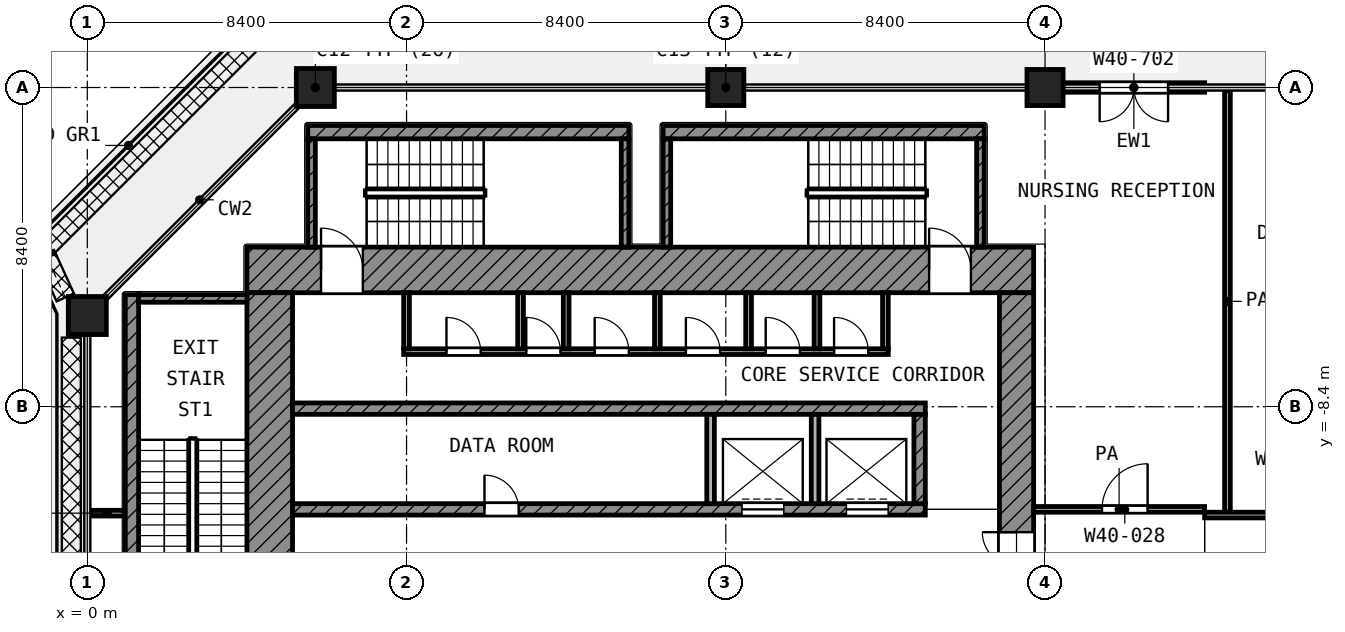
"""IFC4 building model, lengths in metres.
Left out: names, types, materials, properties, quantities, classifications, styles, units other than length and angle.
Written with IfcOpenShell. Run it as: python <this file> out.ifc"""

import sys

from ifc_helpers import new_model, si_unit, direction, frame, frame_2d, origin, origin_2d, place, context, subcontext, project, spatial, rectangle, extrude, element, fill, save


model = new_model("IFC4")
c1 = context("Model", 3, precision=1e-05, world=origin(), true_north=direction((0.0, 1.0)))
c2 = subcontext(c1, "Body", "Model", "MODEL_VIEW")
j1 = project(units=[si_unit("LENGTHUNIT", "METRE"), si_unit("PLANEANGLEUNIT", "RADIAN")], contexts=[c1])
p1 = place(None, origin())
s1 = spatial("IfcSite", under=j1, at=p1, CompositionType="ELEMENT")
p2 = place(p1, origin())
s2 = spatial("IfcBuilding", under=s1, at=p2, CompositionType="ELEMENT")
p3 = place(p2, frame((0.0, 0.0, 196.2)))
s3 = spatial("IfcBuildingStorey", under=s2, at=p3, CompositionType="ELEMENT", Elevation=196.2)
p4 = place(p3, frame((6.0, 0.0, 0.0), z_axis=(0.0, 0.0, 1.0), x_axis=(1.0, 0.0, 0.0)))
e1 = element("IfcColumn", 1, at=p4, inside=s3, PredefinedType="COLUMN", context=c2, shape_type="SweptSolid", body=[
    extrude(rectangle(XDim=1.0, YDim=1.0, at=origin_2d()), origin(), (0.0, 0.0, 1.0), 4.2),
])
for number, where, z_axis, x_axis in (
    (2, (16.8, 0.0, 0.0), (0.0, 0.0, 1.0), (1.0, 0.0, 0.0)),
    (3, (25.2, 0.0, 0.0), (0.0, 0.0, 1.0), (1.0, 0.0, 0.0)),
):
    element("IfcColumn", number, at=place(p3, frame(where, z_axis=z_axis, x_axis=x_axis)), inside=s3, PredefinedType="COLUMN", context=c2, shape_type="SweptSolid", body=[
        extrude(rectangle(XDim=0.95, YDim=0.95, at=origin_2d()), origin(), (0.0, 0.0, 1.0), 4.2),
    ])
p5 = place(p3, frame((0.0, -6.0, 0.0), z_axis=(0.0, 0.0, 1.0), x_axis=(1.0, 0.0, 0.0)))
e4 = element("IfcColumn", 4, at=p5, inside=s3, PredefinedType="COLUMN", context=c2, shape_type="SweptSolid", body=[
    extrude(rectangle(XDim=1.0, YDim=1.0, at=origin_2d()), origin(), (0.0, 0.0, 1.0), 4.2),
])
p6 = place(p3, frame((29.4, 0.0, 0.0), z_axis=(0.0, 0.0, 1.0), x_axis=(-1.0, 0.0, 0.0)))
e5 = element("IfcWall", 5, at=p6, inside=s3, PredefinedType="SOLIDWALL", context=c2, shape_type="SweptSolid", body=[
    extrude(rectangle(XDim=3.725, YDim=0.25, at=frame_2d((1.862, 0.0))), origin(), (0.0, 0.0, 1.0), 2.58),
])
p7 = place(p6, frame((0.962, 0.0, 0.0)))
e6 = element("IfcOpeningElement", 6, at=p7, cuts=e5, PredefinedType="OPENING", context=c2, shape_type="SweptSolid", body=[
    extrude(rectangle(XDim=1.8, YDim=2.1, at=frame_2d((0.9, 1.05))), frame((0.0, 0.135, 0.0), z_axis=(0.0, -1.0, 0.0), x_axis=(1.0, 0.0, 0.0)), (0.0, 0.0, 1.0), 0.27),
])
p8 = place(p3, frame((4.2, -4.8, 0.0), z_axis=(0.0, 0.0, 1.0), x_axis=(1.0, 0.0, 0.0)))
e7 = element("IfcWall", 7, at=p8, inside=s3, PredefinedType="SHEAR", context=c2, shape_type="SweptSolid", body=[
    extrude(rectangle(XDim=20.7, YDim=1.2, at=frame_2d((10.35, 0.0))), origin(), (0.0, 0.0, 1.0), 3.6),
])
p9 = place(p8, frame((1.95, 0.0, 0.0)))
e8 = element("IfcOpeningElement", 8, at=p9, cuts=e7, PredefinedType="OPENING", context=c2, shape_type="SweptSolid", body=[
    extrude(rectangle(XDim=1.1, YDim=2.1, at=frame_2d((0.55, 1.05))), frame((0.0, 0.61, 0.0), z_axis=(0.0, -1.0, 0.0), x_axis=(1.0, 0.0, 0.0)), (0.0, 0.0, 1.0), 1.22),
])
p10 = place(p8, frame((17.95, 0.0, 0.0)))
e9 = element("IfcOpeningElement", 9, at=p10, cuts=e7, PredefinedType="OPENING", context=c2, shape_type="SweptSolid", body=[
    extrude(rectangle(XDim=1.1, YDim=2.1, at=frame_2d((0.55, 1.05))), frame((0.0, 0.61, 0.0), z_axis=(0.0, -1.0, 0.0), x_axis=(1.0, 0.0, 0.0)), (0.0, 0.0, 1.0), 1.22),
])
p11 = place(p3, frame((4.8, -24.9, 0.0), z_axis=(0.0, 0.0, 1.0), x_axis=(0.0, 1.0, 0.0)))
e10 = element("IfcWall", 10, at=p11, inside=s3, PredefinedType="SHEAR", context=c2, shape_type="SweptSolid", body=[
    extrude(rectangle(XDim=19.5, YDim=1.2, at=frame_2d((9.75, 0.0))), origin(), (0.0, 0.0, 1.0), 3.6),
])
p12 = place(p11, frame((11.35, 0.0, 0.0)))
e11 = element("IfcOpeningElement", 11, at=p12, cuts=e10, PredefinedType="OPENING", context=c2, shape_type="SweptSolid", body=[
    extrude(rectangle(XDim=1.1, YDim=2.1, at=frame_2d((0.55, 1.05))), frame((0.0, 0.61, 0.0), z_axis=(0.0, -1.0, 0.0), x_axis=(1.0, 0.0, 0.0)), (0.0, 0.0, 1.0), 1.22),
])
p13 = place(p11, frame((2.05, 0.0, 0.0)))
e12 = element("IfcOpeningElement", 12, at=p13, cuts=e10, PredefinedType="OPENING", context=c2, shape_type="SweptSolid", body=[
    extrude(rectangle(XDim=1.1, YDim=2.1, at=frame_2d((0.55, 1.05))), frame((0.0, 0.61, 0.0), z_axis=(0.0, -1.0, 0.0), x_axis=(1.0, 0.0, 0.0)), (0.0, 0.0, 1.0), 1.22),
])
p14 = place(p3, frame((24.45, -24.0, 0.0), z_axis=(0.0, 0.0, 1.0), x_axis=(0.0, 1.0, 0.0)))
e13 = element("IfcWall", 13, at=p14, inside=s3, PredefinedType="SHEAR", context=c2, shape_type="SweptSolid", body=[
    extrude(rectangle(XDim=18.6, YDim=0.9, at=frame_2d((9.3, 0.0))), origin(), (0.0, 0.0, 1.0), 3.6),
])
p15 = place(p14, frame((10.5, 0.0, 0.0)))
e14 = element("IfcOpeningElement", 14, at=p15, cuts=e13, PredefinedType="OPENING", context=c2, shape_type="SweptSolid", body=[
    extrude(rectangle(XDim=1.8, YDim=2.1, at=frame_2d((0.9, 1.05))), frame((0.0, 0.46, 0.0), z_axis=(0.0, -1.0, 0.0), x_axis=(1.0, 0.0, 0.0)), (0.0, 0.0, 1.0), 0.92),
])
p16 = place(p3, frame((5.4, -8.45, 0.0), z_axis=(0.0, 0.0, 1.0), x_axis=(1.0, 0.0, 0.0)))
e15 = element("IfcWall", 15, at=p16, inside=s3, PredefinedType="SHEAR", context=c2, shape_type="SweptSolid", body=[
    extrude(rectangle(XDim=16.65, YDim=0.3, at=frame_2d((8.325, 0.0))), origin(), (0.0, 0.0, 1.0), 3.6),
])
p17 = place(p3, frame((5.4, -11.1, 0.0), z_axis=(0.0, 0.0, 1.0), x_axis=(1.0, 0.0, 0.0)))
e16 = element("IfcWall", 16, at=p17, inside=s3, PredefinedType="SHEAR", context=c2, shape_type="SweptSolid", body=[
    extrude(rectangle(XDim=16.65, YDim=0.3, at=frame_2d((8.325, 0.0))), origin(), (0.0, 0.0, 1.0), 3.6),
])
p18 = place(p17, frame((11.825, 0.0, 0.0)))
e17 = element("IfcOpeningElement", 17, at=p18, cuts=e16, PredefinedType="OPENING", context=c2, shape_type="SweptSolid", body=[
    extrude(rectangle(XDim=1.1, YDim=2.1, at=frame_2d((0.55, 1.05))), frame((0.0, 0.16, 0.0), z_axis=(0.0, -1.0, 0.0), x_axis=(1.0, 0.0, 0.0)), (0.0, 0.0, 1.0), 0.32),
])
p19 = place(p17, frame((14.575, 0.0, 0.0)))
e18 = element("IfcOpeningElement", 18, at=p19, cuts=e16, PredefinedType="OPENING", context=c2, shape_type="SweptSolid", body=[
    extrude(rectangle(XDim=1.1, YDim=2.1, at=frame_2d((0.55, 1.05))), frame((0.0, 0.16, 0.0), z_axis=(0.0, -1.0, 0.0), x_axis=(1.0, 0.0, 0.0)), (0.0, 0.0, 1.0), 0.32),
])
p20 = place(p17, frame((5.05, 0.0, 0.0)))
e19 = element("IfcOpeningElement", 19, at=p20, cuts=e16, PredefinedType="OPENING", context=c2, shape_type="SweptSolid", body=[
    extrude(rectangle(XDim=0.9, YDim=2.1, at=frame_2d((0.45, 1.05))), frame((0.0, 0.16, 0.0), z_axis=(0.0, -1.0, 0.0), x_axis=(1.0, 0.0, 0.0)), (0.0, 0.0, 1.0), 0.32),
])
p21 = place(p3, frame((21.9, -10.95, 0.0), z_axis=(0.0, 0.0, 1.0), x_axis=(0.0, 1.0, 0.0)))
e20 = element("IfcWall", 20, at=p21, inside=s3, PredefinedType="SHEAR", context=c2, shape_type="SweptSolid", body=[
    extrude(rectangle(XDim=2.35, YDim=0.3, at=frame_2d((1.175, 0.0))), origin(), (0.0, 0.0, 1.0), 3.6),
])
for number, where, z_axis, x_axis in (
    (21, (16.4, -10.95, 0.0), (0.0, 0.0, 1.0), (0.0, 1.0, 0.0)),
    (22, (19.15, -10.95, 0.0), (0.0, 0.0, 1.0), (0.0, 1.0, 0.0)),
):
    element("IfcWall", number, at=place(p3, frame(where, z_axis=z_axis, x_axis=x_axis)), inside=s3, PredefinedType="PARTITIONING", context=c2, shape_type="SweptSolid", body=[
        extrude(rectangle(XDim=2.35, YDim=0.2, at=frame_2d((1.175, 0.0))), origin(), (0.0, 0.0, 1.0), 3.6),
    ])
p22 = place(p3, frame((8.325, -6.95, 0.0), z_axis=(0.0, 0.0, 1.0), x_axis=(1.0, 0.0, 0.0)))
e23 = element("IfcWall", 23, at=p22, inside=s3, PredefinedType="PARTITIONING", context=c2, shape_type="SweptSolid", body=[
    extrude(rectangle(XDim=12.75, YDim=0.15, at=frame_2d((6.375, 0.0))), origin(), (0.0, 0.0, 1.0), 3.6),
])
p23 = place(p22, frame((1.125, 0.0, 0.0)))
e24 = element("IfcOpeningElement", 24, at=p23, cuts=e23, PredefinedType="OPENING", context=c2, shape_type="SweptSolid", body=[
    extrude(rectangle(XDim=0.9, YDim=2.1, at=frame_2d((0.45, 1.05))), frame((0.0, 0.085, 0.0), z_axis=(0.0, -1.0, 0.0), x_axis=(1.0, 0.0, 0.0)), (0.0, 0.0, 1.0), 0.17),
])
p24 = place(p22, frame((3.225, 0.0, 0.0)))
e25 = element("IfcOpeningElement", 25, at=p24, cuts=e23, PredefinedType="OPENING", context=c2, shape_type="SweptSolid", body=[
    extrude(rectangle(XDim=0.9, YDim=2.1, at=frame_2d((0.45, 1.05))), frame((0.0, 0.085, 0.0), z_axis=(0.0, -1.0, 0.0), x_axis=(1.0, 0.0, 0.0)), (0.0, 0.0, 1.0), 0.17),
])
p25 = place(p22, frame((5.025, 0.0, 0.0)))
e26 = element("IfcOpeningElement", 26, at=p25, cuts=e23, PredefinedType="OPENING", context=c2, shape_type="SweptSolid", body=[
    extrude(rectangle(XDim=0.9, YDim=2.1, at=frame_2d((0.45, 1.05))), frame((0.0, 0.085, 0.0), z_axis=(0.0, -1.0, 0.0), x_axis=(1.0, 0.0, 0.0)), (0.0, 0.0, 1.0), 0.17),
])
p26 = place(p22, frame((7.425, 0.0, 0.0)))
e27 = element("IfcOpeningElement", 27, at=p26, cuts=e23, PredefinedType="OPENING", context=c2, shape_type="SweptSolid", body=[
    extrude(rectangle(XDim=0.9, YDim=2.1, at=frame_2d((0.45, 1.05))), frame((0.0, 0.085, 0.0), z_axis=(0.0, -1.0, 0.0), x_axis=(1.0, 0.0, 0.0)), (0.0, 0.0, 1.0), 0.17),
])
p27 = place(p22, frame((9.525, 0.0, 0.0)))
e28 = element("IfcOpeningElement", 28, at=p27, cuts=e23, PredefinedType="OPENING", context=c2, shape_type="SweptSolid", body=[
    extrude(rectangle(XDim=0.9, YDim=2.1, at=frame_2d((0.45, 1.05))), frame((0.0, 0.085, 0.0), z_axis=(0.0, -1.0, 0.0), x_axis=(1.0, 0.0, 0.0)), (0.0, 0.0, 1.0), 0.17),
])
p28 = place(p22, frame((11.325, 0.0, 0.0)))
e29 = element("IfcOpeningElement", 29, at=p28, cuts=e23, PredefinedType="OPENING", context=c2, shape_type="SweptSolid", body=[
    extrude(rectangle(XDim=0.9, YDim=2.1, at=frame_2d((0.45, 1.05))), frame((0.0, 0.085, 0.0), z_axis=(0.0, -1.0, 0.0), x_axis=(1.0, 0.0, 0.0)), (0.0, 0.0, 1.0), 0.17),
])
for number, where, z_axis, x_axis in (
    (30, (8.4, -6.875, 0.0), (0.0, 0.0, 1.0), (0.0, 1.0, 0.0)),
    (31, (11.4, -6.875, 0.0), (0.0, 0.0, 1.0), (0.0, 1.0, 0.0)),
    (32, (12.6, -6.875, 0.0), (0.0, 0.0, 1.0), (0.0, 1.0, 0.0)),
    (33, (15.0, -6.875, 0.0), (0.0, 0.0, 1.0), (0.0, 1.0, 0.0)),
    (34, (17.4, -6.875, 0.0), (0.0, 0.0, 1.0), (0.0, 1.0, 0.0)),
    (35, (19.2, -6.875, 0.0), (0.0, 0.0, 1.0), (0.0, 1.0, 0.0)),
    (36, (21.0, -6.875, 0.0), (0.0, 0.0, 1.0), (0.0, 1.0, 0.0)),
):
    element("IfcWall", number, at=place(p3, frame(where, z_axis=z_axis, x_axis=x_axis)), inside=s3, PredefinedType="PARTITIONING", context=c2, shape_type="SweptSolid", body=[
        extrude(rectangle(XDim=1.475, YDim=0.15, at=frame_2d((0.738, 0.0))), origin(), (0.0, 0.0, 1.0), 3.6),
    ])
p29 = place(p3, frame((1.175, -13.9, 0.0), z_axis=(0.0, 0.0, 1.0), x_axis=(0.0, 1.0, 0.0)))
e37 = element("IfcWall", 37, at=p29, inside=s3, PredefinedType="SHEAR", context=c2, shape_type="SweptSolid", body=[
    extrude(rectangle(XDim=8.45, YDim=0.35, at=frame_2d((4.225, 0.0))), origin(), (0.0, 0.0, 1.0), 3.6),
])
p30 = place(p3, frame((1.35, -5.55, 0.0), z_axis=(0.0, 0.0, 1.0), x_axis=(1.0, 0.0, 0.0)))
e38 = element("IfcWall", 38, at=p30, inside=s3, PredefinedType="SHEAR", context=c2, shape_type="SweptSolid", body=[
    extrude(rectangle(XDim=2.85, YDim=0.2, at=frame_2d((1.425, 0.0))), origin(), (0.0, 0.0, 1.0), 3.6),
])
p31 = place(p3, frame((5.8, -1.175, 0.0), z_axis=(0.0, 0.0, 1.0), x_axis=(1.0, 0.0, 0.0)))
e39 = element("IfcWall", 39, at=p31, inside=s3, PredefinedType="SHEAR", context=c2, shape_type="SweptSolid", body=[
    extrude(rectangle(XDim=8.45, YDim=0.35, at=frame_2d((4.225, 0.0))), origin(), (0.0, 0.0, 1.0), 3.6),
])
for number, where, z_axis, x_axis in (
    (40, (5.9, -4.2, 0.0), (0.0, 0.0, 1.0), (0.0, 1.0, 0.0)),
    (41, (14.15, -4.2, 0.0), (0.0, 0.0, 1.0), (0.0, 1.0, 0.0)),
):
    element("IfcWall", number, at=place(p3, frame(where, z_axis=z_axis, x_axis=x_axis)), inside=s3, PredefinedType="SHEAR", context=c2, shape_type="SweptSolid", body=[
        extrude(rectangle(XDim=2.85, YDim=0.2, at=frame_2d((1.425, 0.0))), origin(), (0.0, 0.0, 1.0), 3.6),
    ])
p32 = place(p3, frame((15.15, -1.175, 0.0), z_axis=(0.0, 0.0, 1.0), x_axis=(1.0, 0.0, 0.0)))
e42 = element("IfcWall", 42, at=p32, inside=s3, PredefinedType="SHEAR", context=c2, shape_type="SweptSolid", body=[
    extrude(rectangle(XDim=8.45, YDim=0.35, at=frame_2d((4.225, 0.0))), origin(), (0.0, 0.0, 1.0), 3.6),
])
for number, where, z_axis, x_axis in (
    (43, (15.25, -4.2, 0.0), (0.0, 0.0, 1.0), (0.0, 1.0, 0.0)),
    (44, (23.5, -4.2, 0.0), (0.0, 0.0, 1.0), (0.0, 1.0, 0.0)),
):
    element("IfcWall", number, at=place(p3, frame(where, z_axis=z_axis, x_axis=x_axis)), inside=s3, PredefinedType="SHEAR", context=c2, shape_type="SweptSolid", body=[
        extrude(rectangle(XDim=2.85, YDim=0.2, at=frame_2d((1.425, 0.0))), origin(), (0.0, 0.0, 1.0), 3.6),
    ])
p33 = place(p3, frame((29.4, -11.25, 0.0), z_axis=(0.0, 0.0, 1.0), x_axis=(1.0, 0.0, 0.0)))
e45 = element("IfcWall", 45, at=p33, inside=s3, PredefinedType="PARTITIONING", context=c2, shape_type="SweptSolid", body=[
    extrude(rectangle(XDim=10.782, YDim=0.15, at=frame_2d((5.391, 0.0))), origin(), (0.0, 0.0, 1.0), 3.6),
])
p34 = place(p33, frame((1.9, 0.0, 0.0)))
e46 = element("IfcOpeningElement", 46, at=p34, cuts=e45, PredefinedType="OPENING", context=c2, shape_type="SweptSolid", body=[
    extrude(rectangle(XDim=1.0, YDim=2.1, at=frame_2d((0.5, 1.05))), frame((0.0, 0.085, 0.0), z_axis=(0.0, -1.0, 0.0), x_axis=(1.0, 0.0, 0.0)), (0.0, 0.0, 1.0), 0.17),
])
p35 = place(p33, frame((4.4, 0.0, 0.0)))
e47 = element("IfcOpeningElement", 47, at=p35, cuts=e45, PredefinedType="OPENING", context=c2, shape_type="SweptSolid", body=[
    extrude(rectangle(XDim=1.2, YDim=2.1, at=frame_2d((0.6, 1.05))), frame((0.0, 0.085, 0.0), z_axis=(0.0, -1.0, 0.0), x_axis=(1.0, 0.0, 0.0)), (0.0, 0.0, 1.0), 0.17),
])
p36 = place(p3, frame((0.08, -11.2, 0.0), z_axis=(0.0, 0.0, 1.0), x_axis=(1.0, 0.0, 0.0)))
e48 = element("IfcWall", 48, at=p36, inside=s3, PredefinedType="PARTITIONING", context=c2, shape_type="SweptSolid", body=[
    extrude(rectangle(XDim=0.89, YDim=0.15, at=frame_2d((0.445, 0.0))), origin(), (0.0, 0.0, 1.0), 3.6),
])
p37 = place(p3, frame((24.9, -11.1, 0.0), z_axis=(0.0, 0.0, 1.0), x_axis=(1.0, 0.0, 0.0)))
e49 = element("IfcWall", 49, at=p37, inside=s3, PredefinedType="PARTITIONING", context=c2, shape_type="SweptSolid", body=[
    extrude(rectangle(XDim=4.498, YDim=0.15, at=frame_2d((2.249, 0.0))), origin(), (0.0, 0.0, 1.0), 3.6),
])
p38 = place(p37, frame((1.799, 0.0, 0.0)))
e50 = element("IfcOpeningElement", 50, at=p38, cuts=e49, PredefinedType="OPENING", context=c2, shape_type="SweptSolid", body=[
    extrude(rectangle(XDim=1.2, YDim=2.1, at=frame_2d((0.6, 1.05))), frame((0.0, 0.085, 0.0), z_axis=(0.0, -1.0, 0.0), x_axis=(1.0, 0.0, 0.0)), (0.0, 0.0, 1.0), 0.17),
])
p39 = place(p3, frame((30.0, -11.175, 0.0), z_axis=(0.0, 0.0, 1.0), x_axis=(0.0, 1.0, 0.0)))
e51 = element("IfcWall", 51, at=p39, inside=s3, PredefinedType="PARTITIONING", context=c2, shape_type="SweptSolid", body=[
    extrude(rectangle(XDim=11.095, YDim=0.15, at=frame_2d((5.547, 0.0))), origin(), (0.0, 0.0, 1.0), 2.7),
])
p40 = place(p7, origin())
e52 = element("IfcDoor", 52, at=p40, inside=s3, OperationType="DOUBLE_DOOR_SINGLE_SWING", PredefinedType="DOOR", context=c2, shape_type="SweptSolid", body=[
    extrude(rectangle(XDim=1.8, YDim=2.1, at=frame_2d((0.9, 1.05))), frame((0.0, 0.025, 0.0), z_axis=(0.0, -1.0, 0.0), x_axis=(1.0, 0.0, 0.0)), (0.0, 0.0, 1.0), 0.05),
])
fill(e6, e52)
p41 = place(p18, origin())
e53 = element("IfcDoor", 53, at=p41, inside=s3, OperationType="DOUBLE_DOOR_SLIDING", PredefinedType="DOOR", context=c2, shape_type="SweptSolid", body=[
    extrude(rectangle(XDim=1.1, YDim=2.1, at=frame_2d((0.55, 1.05))), frame((0.0, 0.025, 0.0), z_axis=(0.0, -1.0, 0.0), x_axis=(1.0, 0.0, 0.0)), (0.0, 0.0, 1.0), 0.05),
])
fill(e17, e53)
p42 = place(p19, origin())
e54 = element("IfcDoor", 54, at=p42, inside=s3, OperationType="DOUBLE_DOOR_SLIDING", PredefinedType="DOOR", context=c2, shape_type="SweptSolid", body=[
    extrude(rectangle(XDim=1.1, YDim=2.1, at=frame_2d((0.55, 1.05))), frame((0.0, 0.025, 0.0), z_axis=(0.0, -1.0, 0.0), x_axis=(1.0, 0.0, 0.0)), (0.0, 0.0, 1.0), 0.05),
])
fill(e18, e54)
p43 = place(p9, origin())
e55 = element("IfcDoor", 55, at=p43, inside=s3, OperationType="SINGLE_SWING_LEFT", PredefinedType="DOOR", context=c2, shape_type="SweptSolid", body=[
    extrude(rectangle(XDim=1.1, YDim=2.1, at=frame_2d((0.55, 1.05))), frame((0.0, 0.025, 0.0), z_axis=(0.0, -1.0, 0.0), x_axis=(1.0, 0.0, 0.0)), (0.0, 0.0, 1.0), 0.05),
])
fill(e8, e55)
p44 = place(p10, origin())
e56 = element("IfcDoor", 56, at=p44, inside=s3, OperationType="SINGLE_SWING_LEFT", PredefinedType="DOOR", context=c2, shape_type="SweptSolid", body=[
    extrude(rectangle(XDim=1.1, YDim=2.1, at=frame_2d((0.55, 1.05))), frame((0.0, 0.025, 0.0), z_axis=(0.0, -1.0, 0.0), x_axis=(1.0, 0.0, 0.0)), (0.0, 0.0, 1.0), 0.05),
])
fill(e9, e56)
p45 = place(p15, origin())
e57 = element("IfcDoor", 57, at=p45, inside=s3, OperationType="DOUBLE_DOOR_SINGLE_SWING", PredefinedType="DOOR", context=c2, shape_type="SweptSolid", body=[
    extrude(rectangle(XDim=1.8, YDim=2.1, at=frame_2d((0.9, 1.05))), frame((0.0, 0.025, 0.0), z_axis=(0.0, -1.0, 0.0), x_axis=(1.0, 0.0, 0.0)), (0.0, 0.0, 1.0), 0.05),
])
fill(e14, e57)
p46 = place(p23, origin())
e58 = element("IfcDoor", 58, at=p46, inside=s3, OperationType="SINGLE_SWING_LEFT", PredefinedType="DOOR", context=c2, shape_type="SweptSolid", body=[
    extrude(rectangle(XDim=0.9, YDim=2.1, at=frame_2d((0.45, 1.05))), frame((0.0, 0.025, 0.0), z_axis=(0.0, -1.0, 0.0), x_axis=(1.0, 0.0, 0.0)), (0.0, 0.0, 1.0), 0.05),
])
fill(e24, e58)
p47 = place(p24, origin())
e59 = element("IfcDoor", 59, at=p47, inside=s3, OperationType="SINGLE_SWING_LEFT", PredefinedType="DOOR", context=c2, shape_type="SweptSolid", body=[
    extrude(rectangle(XDim=0.9, YDim=2.1, at=frame_2d((0.45, 1.05))), frame((0.0, 0.025, 0.0), z_axis=(0.0, -1.0, 0.0), x_axis=(1.0, 0.0, 0.0)), (0.0, 0.0, 1.0), 0.05),
])
fill(e25, e59)
p48 = place(p25, origin())
e60 = element("IfcDoor", 60, at=p48, inside=s3, OperationType="SINGLE_SWING_LEFT", PredefinedType="DOOR", context=c2, shape_type="SweptSolid", body=[
    extrude(rectangle(XDim=0.9, YDim=2.1, at=frame_2d((0.45, 1.05))), frame((0.0, 0.025, 0.0), z_axis=(0.0, -1.0, 0.0), x_axis=(1.0, 0.0, 0.0)), (0.0, 0.0, 1.0), 0.05),
])
fill(e26, e60)
p49 = place(p26, origin())
e61 = element("IfcDoor", 61, at=p49, inside=s3, OperationType="SINGLE_SWING_LEFT", PredefinedType="DOOR", context=c2, shape_type="SweptSolid", body=[
    extrude(rectangle(XDim=0.9, YDim=2.1, at=frame_2d((0.45, 1.05))), frame((0.0, 0.025, 0.0), z_axis=(0.0, -1.0, 0.0), x_axis=(1.0, 0.0, 0.0)), (0.0, 0.0, 1.0), 0.05),
])
fill(e27, e61)
p50 = place(p27, origin())
e62 = element("IfcDoor", 62, at=p50, inside=s3, OperationType="SINGLE_SWING_LEFT", PredefinedType="DOOR", context=c2, shape_type="SweptSolid", body=[
    extrude(rectangle(XDim=0.9, YDim=2.1, at=frame_2d((0.45, 1.05))), frame((0.0, 0.025, 0.0), z_axis=(0.0, -1.0, 0.0), x_axis=(1.0, 0.0, 0.0)), (0.0, 0.0, 1.0), 0.05),
])
fill(e28, e62)
p51 = place(p28, origin())
e63 = element("IfcDoor", 63, at=p51, inside=s3, OperationType="SINGLE_SWING_LEFT", PredefinedType="DOOR", context=c2, shape_type="SweptSolid", body=[
    extrude(rectangle(XDim=0.9, YDim=2.1, at=frame_2d((0.45, 1.05))), frame((0.0, 0.025, 0.0), z_axis=(0.0, -1.0, 0.0), x_axis=(1.0, 0.0, 0.0)), (0.0, 0.0, 1.0), 0.05),
])
fill(e29, e63)
p52 = place(p20, origin())
e64 = element("IfcDoor", 64, at=p52, inside=s3, OperationType="SINGLE_SWING_LEFT", PredefinedType="DOOR", context=c2, shape_type="SweptSolid", body=[
    extrude(rectangle(XDim=0.9, YDim=2.1, at=frame_2d((0.45, 1.05))), frame((0.0, 0.025, 0.0), z_axis=(0.0, -1.0, 0.0), x_axis=(1.0, 0.0, 0.0)), (0.0, 0.0, 1.0), 0.05),
])
fill(e19, e64)
p53 = place(p38, origin())
e65 = element("IfcDoor", 65, at=p53, inside=s3, OperationType="SINGLE_SWING_RIGHT", PredefinedType="DOOR", context=c2, shape_type="SweptSolid", body=[
    extrude(rectangle(XDim=1.2, YDim=2.1, at=frame_2d((0.6, 1.05))), frame((0.0, 0.025, 0.0), z_axis=(0.0, -1.0, 0.0), x_axis=(1.0, 0.0, 0.0)), (0.0, 0.0, 1.0), 0.05),
])
fill(e50, e65)
save(model, sys.argv[1])
